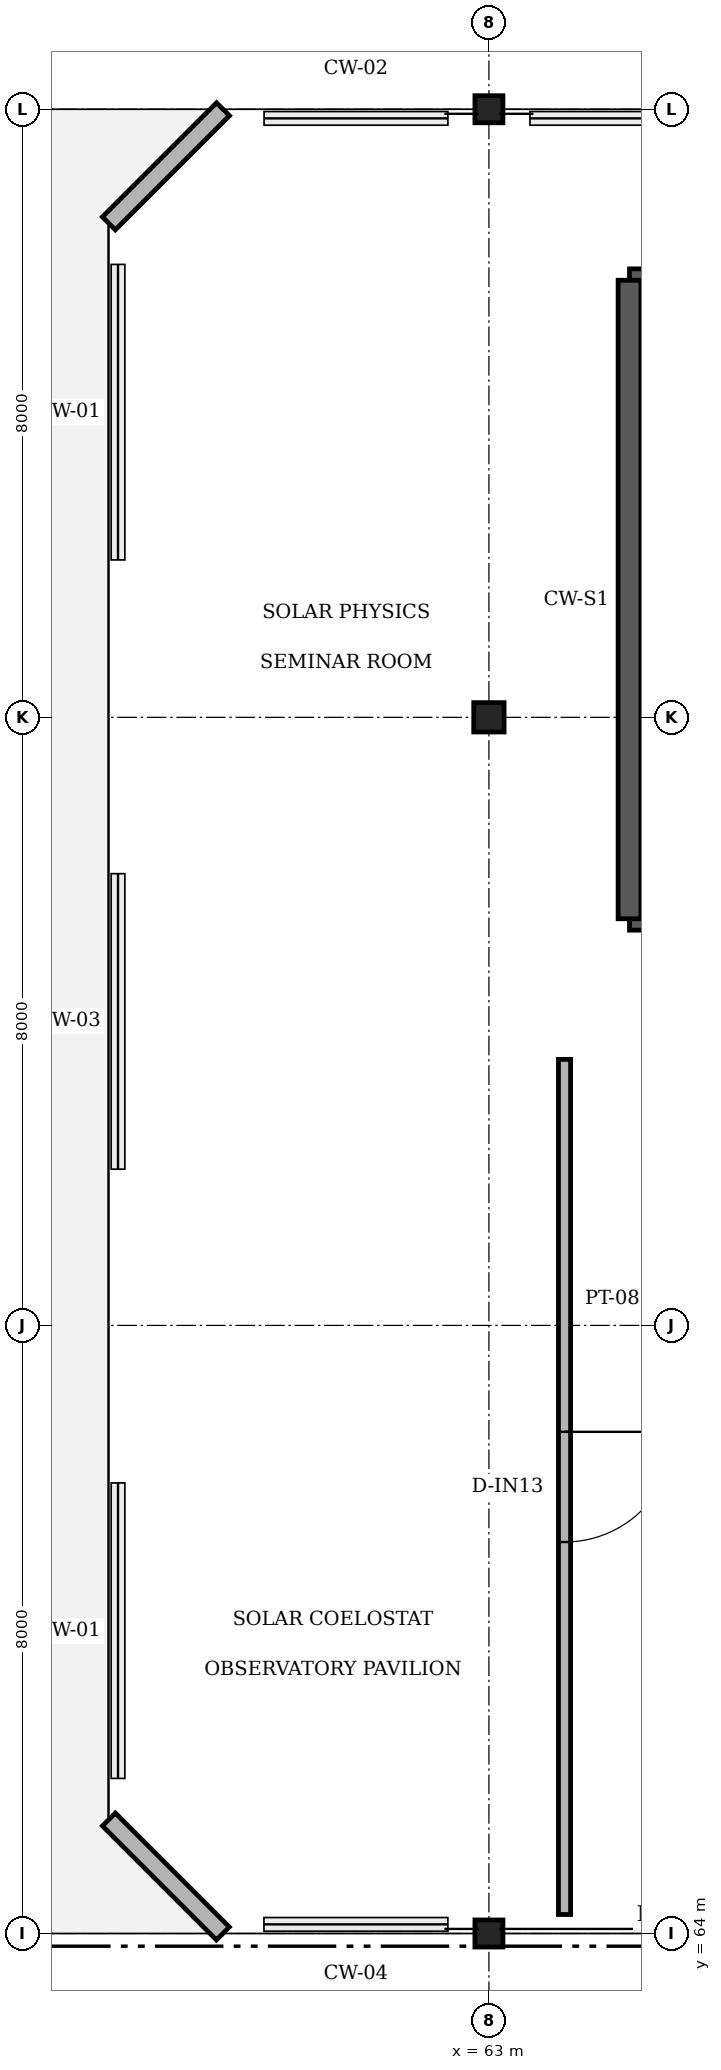
"""IFC4 building model, lengths in metres.
Left out: names, types, materials, properties, quantities, classifications, styles, units other than length and angle.
Written with IfcOpenShell. Run it as: python <this file> out.ifc"""

import sys

from ifc_helpers import new_model, si_unit, direction, frame, frame_2d, origin, origin_2d, place, context, subcontext, project, spatial, rectangle, i_section, extrude, element, fill, save


model = new_model("IFC4")
c1 = context("Model", 3, precision=1e-05, world=origin(), true_north=direction((0.0, 1.0)))
c2 = subcontext(c1, "Body", "Model", "MODEL_VIEW")
j1 = project(units=[si_unit("LENGTHUNIT", "METRE"), si_unit("PLANEANGLEUNIT", "RADIAN")], contexts=[c1])
p1 = place(None, origin())
s1 = spatial("IfcSite", under=j1, at=p1, CompositionType="ELEMENT")
p2 = place(p1, origin())
s2 = spatial("IfcBuilding", under=s1, at=p2, CompositionType="ELEMENT")
p3 = place(p2, frame((0.0, 0.0, 25.2)))
s3 = spatial("IfcBuildingStorey", under=s2, at=p3, CompositionType="ELEMENT", Elevation=25.2)
p4 = place(p3, frame((63.0, 64.0, 0.0), z_axis=(0.0, 0.0, 1.0), x_axis=(1.0, 0.0, 0.0)))
e1 = element("IfcColumn", 1, at=p4, inside=s3, PredefinedType="COLUMN", context=c2, shape_type="SweptSolid", body=[
    extrude(i_section(OverallWidth=0.368, OverallDepth=0.356, WebThickness=0.011, FlangeThickness=0.018, FilletRadius=0.015, at=origin_2d()), origin(), (0.0, 0.0, 1.0), 5.55),
])
p5 = place(p3, frame((63.0, 80.0, 0.0), z_axis=(0.0, 0.0, 1.0), x_axis=(1.0, 0.0, 0.0)))
e2 = element("IfcColumn", 2, at=p5, inside=s3, PredefinedType="COLUMN", context=c2, shape_type="SweptSolid", body=[
    extrude(i_section(OverallWidth=0.399, OverallDepth=0.386, WebThickness=0.021, FlangeThickness=0.033, FilletRadius=0.015, at=origin_2d()), origin(), (0.0, 0.0, 1.0), 5.55),
])
p6 = place(p3, frame((63.0, 88.0, 0.0), z_axis=(0.0, 0.0, 1.0), x_axis=(1.0, 0.0, 0.0)))
e3 = element("IfcColumn", 3, at=p6, inside=s3, PredefinedType="COLUMN", context=c2, shape_type="SweptSolid", body=[
    extrude(i_section(OverallWidth=0.368, OverallDepth=0.356, WebThickness=0.011, FlangeThickness=0.018, FilletRadius=0.015, at=origin_2d()), origin(), (0.0, 0.0, 1.0), 5.55),
])
p7 = place(p3, frame((58.0, 86.499, 0.0), z_axis=(0.0, 0.0, 1.0), x_axis=(0.707106781187, 0.707106781187, 0.0)))
e4 = element("IfcWall", 4, at=p7, inside=s3, PredefinedType="SOLIDWALL", context=c2, shape_type="SweptSolid", body=[
    extrude(rectangle(XDim=2.123, YDim=0.24, at=frame_2d((1.062, 0.0))), origin(), (0.0, 0.0, 1.0), 4.14),
])
p8 = place(p3, frame((59.5, 64.0, 0.0), z_axis=(0.0, 0.0, 1.0), x_axis=(-0.707106781187, 0.707106781187, 0.0)))
e5 = element("IfcWall", 5, at=p8, inside=s3, PredefinedType="SOLIDWALL", context=c2, shape_type="SweptSolid", body=[
    extrude(rectangle(XDim=2.121, YDim=0.24, at=frame_2d((1.061, 0.0))), origin(), (0.0, 0.0, 1.0), 4.14),
])
p9 = place(p3, frame((69.15, 77.35, 0.0), z_axis=(0.0, 0.0, 1.0), x_axis=(-1.0, 0.0, 0.0)))
e6 = element("IfcWall", 6, at=p9, inside=s3, PredefinedType="SOLIDWALL", context=c2, shape_type="SweptSolid", body=[
    extrude(rectangle(XDim=4.3, YDim=0.3, at=frame_2d((2.15, 0.0))), origin(), (0.0, 0.0, 1.0), 4.8),
])
p10 = place(p9, frame((1.575, 0.0, 0.0)))
e7 = element("IfcOpeningElement", 7, at=p10, cuts=e6, PredefinedType="OPENING", context=c2, shape_type="SweptSolid", body=[
    extrude(rectangle(XDim=1.15, YDim=2.2, at=frame_2d((0.575, 1.1))), frame((0.0, 0.16, 0.0), z_axis=(0.0, -1.0, 0.0), x_axis=(1.0, 0.0, 0.0)), (0.0, 0.0, 1.0), 0.32),
])
p11 = place(p3, frame((69.15, 85.75, 0.0), z_axis=(0.0, 0.0, 1.0), x_axis=(-1.0, 0.0, 0.0)))
e8 = element("IfcWall", 8, at=p11, inside=s3, PredefinedType="SOLIDWALL", context=c2, shape_type="SweptSolid", body=[
    extrude(rectangle(XDim=4.3, YDim=0.3, at=frame_2d((2.15, 0.0))), origin(), (0.0, 0.0, 1.0), 4.8),
])
p12 = place(p3, frame((64.85, 77.35, 0.0), z_axis=(0.0, 0.0, 1.0), x_axis=(0.0, 1.0, 0.0)))
e9 = element("IfcWall", 9, at=p12, inside=s3, PredefinedType="SOLIDWALL", context=c2, shape_type="SweptSolid", body=[
    extrude(rectangle(XDim=8.4, YDim=0.3, at=frame_2d((4.2, 0.0))), origin(), (0.0, 0.0, 1.0), 4.8),
])
p13 = place(p3, frame((63.995, 75.5, 0.0), z_axis=(0.0, 0.0, 1.0), x_axis=(0.0, -1.0, 0.0)))
e10 = element("IfcWall", 10, at=p13, inside=s3, PredefinedType="PARTITIONING", context=c2, shape_type="SweptSolid", body=[
    extrude(rectangle(XDim=11.25, YDim=0.16, at=frame_2d((5.625, 0.0))), origin(), (0.0, 0.0, 1.0), 3.15),
])
p14 = place(p13, frame((4.9, 0.0, 0.0)))
e11 = element("IfcOpeningElement", 11, at=p14, cuts=e10, PredefinedType="OPENING", context=c2, shape_type="SweptSolid", body=[
    extrude(rectangle(XDim=1.45, YDim=2.2, at=frame_2d((0.725, 1.1))), frame((0.0, 0.09, 0.0), z_axis=(0.0, -1.0, 0.0), x_axis=(1.0, 0.0, 0.0)), (0.0, 0.0, 1.0), 0.18),
])
p15 = place(p14, origin())
e12 = element("IfcDoor", 12, at=p15, inside=s3, OperationType="SINGLE_SWING_LEFT", PredefinedType="DOOR", context=c2, shape_type="SweptSolid", body=[
    extrude(rectangle(XDim=1.45, YDim=2.2, at=frame_2d((0.725, 1.1))), frame((0.0, 0.025, 0.0), z_axis=(0.0, -1.0, 0.0), x_axis=(1.0, 0.0, 0.0)), (0.0, 0.0, 1.0), 0.05),
])
fill(e11, e12)
save(model, sys.argv[1])
